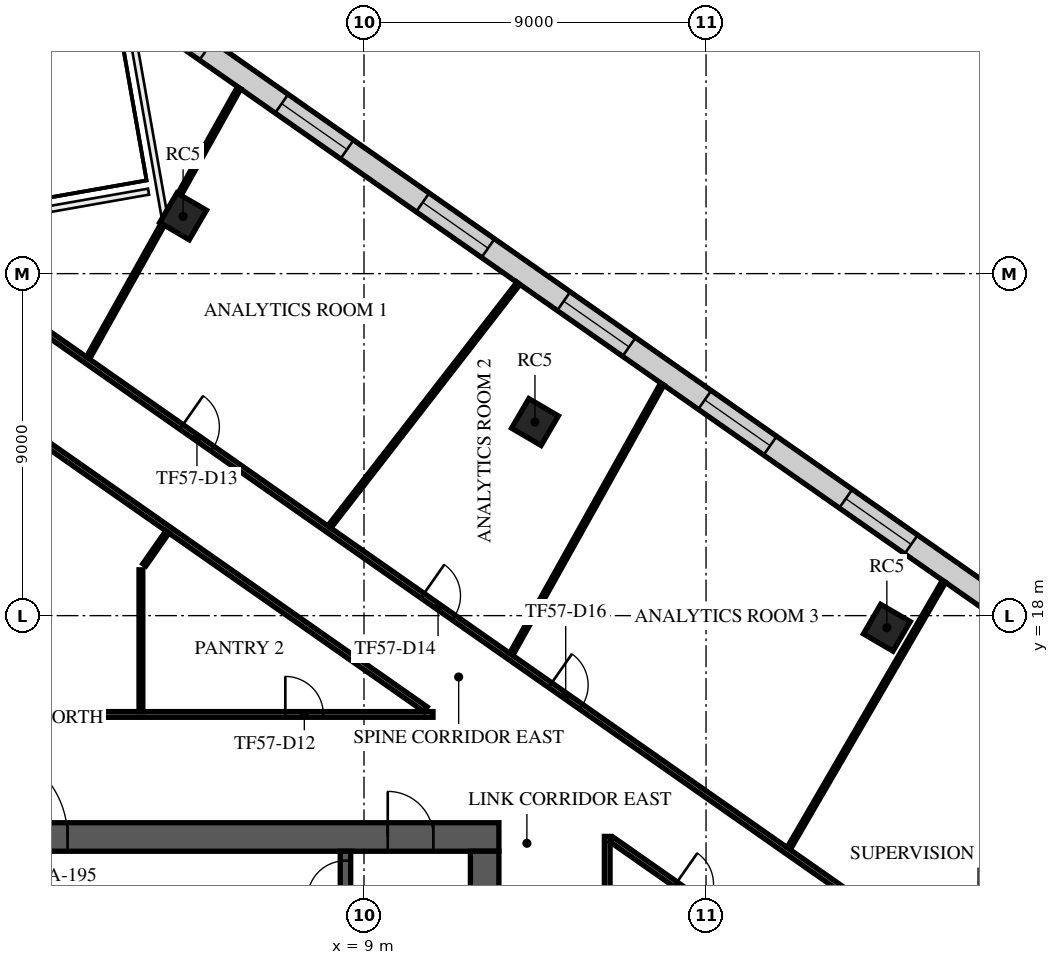
"""IFC4 building model, lengths in metres.
Left out: names, types, materials, properties, quantities, classifications, styles, units other than length and angle.
Written with IfcOpenShell. Run it as: python <this file> out.ifc"""

import sys

from ifc_helpers import new_model, si_unit, direction, frame, frame_2d, origin, origin_2d, place, context, subcontext, project, spatial, rectangle, extrude, element, fill, save


model = new_model("IFC4")
c1 = context("Model", 3, precision=1e-05, world=origin(), true_north=direction((0.0, 1.0)))
c2 = subcontext(c1, "Body", "Model", "MODEL_VIEW")
j1 = project(units=[si_unit("LENGTHUNIT", "METRE"), si_unit("PLANEANGLEUNIT", "RADIAN")], contexts=[c1])
p1 = place(None, origin())
s1 = spatial("IfcSite", under=j1, at=p1, CompositionType="ELEMENT")
p2 = place(p1, origin())
s2 = spatial("IfcBuilding", under=s1, at=p2, CompositionType="ELEMENT")
p3 = place(p2, frame((0.0, 0.0, 242.9)))
s3 = spatial("IfcBuildingStorey", under=s2, at=p3, CompositionType="ELEMENT", Elevation=242.9)
for number, where, z_axis, x_axis in (
    (1, (22.758, 17.682, -0.36), (0.0, 0.0, 1.0), (0.505, 0.863, 0.0)),
    (2, (13.499, 23.094, -0.36), (0.0, 0.0, 1.0), (0.505, 0.863, 0.0)),
    (3, (4.24, 28.506, -0.36), (0.0, 0.0, 1.0), (0.505, 0.863, 0.0)),
):
    element("IfcColumn", number, at=place(p3, frame(where, z_axis=z_axis, x_axis=x_axis)), inside=s3, PredefinedType="COLUMN", context=c2, shape_type="SweptSolid", body=[
        extrude(rectangle(XDim=0.9, YDim=0.9, at=origin_2d()), origin(), (0.0, 0.0, 1.0), 4.36),
    ])
p4 = place(p3, frame((-12.55, 12.175, 0.0), z_axis=(0.0, 0.0, 1.0), x_axis=(1.0, 0.0, 0.0)))
e4 = element("IfcWall", 4, at=p4, inside=s3, PredefinedType="SHEAR", context=c2, shape_type="SweptSolid", body=[
    extrude(rectangle(XDim=25.1, YDim=0.75, at=frame_2d((12.55, 0.0))), origin(), (0.0, 0.0, 1.0), 3.64),
])
p5 = place(p4, frame((11.35, 0.0, 0.0)))
e5 = element("IfcOpeningElement", 5, at=p5, cuts=e4, PredefinedType="OPENING", context=c2, shape_type="SweptSolid", body=[
    extrude(rectangle(XDim=2.4, YDim=2.4, at=frame_2d((1.2, 1.2))), frame((0.0, 0.385, 0.0), z_axis=(0.0, -1.0, 0.0), x_axis=(1.0, 0.0, 0.0)), (0.0, 0.0, 1.0), 0.77),
])
p6 = place(p4, frame((22.175, 0.0, 0.0)))
e6 = element("IfcOpeningElement", 6, at=p6, cuts=e4, PredefinedType="OPENING", context=c2, shape_type="SweptSolid", body=[
    extrude(rectangle(XDim=1.2, YDim=2.1, at=frame_2d((0.6, 1.05))), frame((0.0, 0.385, 0.0), z_axis=(0.0, -1.0, 0.0), x_axis=(1.0, 0.0, 0.0)), (0.0, 0.0, 1.0), 0.77),
])
p7 = place(p4, frame((1.15, 0.0, 0.0)))
e7 = element("IfcOpeningElement", 7, at=p7, cuts=e4, PredefinedType="OPENING", context=c2, shape_type="SweptSolid", body=[
    extrude(rectangle(XDim=1.0, YDim=2.1, at=frame_2d((0.5, 1.05))), frame((0.0, 0.385, 0.0), z_axis=(0.0, -1.0, 0.0), x_axis=(1.0, 0.0, 0.0)), (0.0, 0.0, 1.0), 0.77),
])
p8 = place(p3, frame((12.175, -11.8, 0.0), z_axis=(0.0, 0.0, 1.0), x_axis=(0.0, 1.0, 0.0)))
e8 = element("IfcWall", 8, at=p8, inside=s3, PredefinedType="SHEAR", context=c2, shape_type="SweptSolid", body=[
    extrude(rectangle(XDim=23.6, YDim=0.75, at=frame_2d((11.8, 0.0))), origin(), (0.0, 0.0, 1.0), 3.64),
])
p9 = place(p8, frame((10.6, 0.0, 0.0)))
e9 = element("IfcOpeningElement", 9, at=p9, cuts=e8, PredefinedType="OPENING", context=c2, shape_type="SweptSolid", body=[
    extrude(rectangle(XDim=2.4, YDim=2.4, at=frame_2d((1.2, 1.2))), frame((0.0, 0.385, 0.0), z_axis=(0.0, -1.0, 0.0), x_axis=(1.0, 0.0, 0.0)), (0.0, 0.0, 1.0), 0.77),
])
p10 = place(p3, frame((8.512, 4.55, 0.0), z_axis=(0.0, 0.0, 1.0), x_axis=(0.0, 1.0, 0.0)))
e10 = element("IfcWall", 10, at=p10, inside=s3, PredefinedType="SOLIDWALL", context=c2, shape_type="SweptSolid", body=[
    extrude(rectangle(XDim=7.25, YDim=0.275, at=frame_2d((3.625, 0.0))), origin(), (0.0, 0.0, 1.0), 3.64),
])
p11 = place(p10, frame((6.0, 0.0, 0.0)))
e11 = element("IfcOpeningElement", 11, at=p11, cuts=e10, PredefinedType="OPENING", context=c2, shape_type="SweptSolid", body=[
    extrude(rectangle(XDim=1.0, YDim=2.1, at=frame_2d((0.5, 1.05))), frame((0.0, 0.147, 0.0), z_axis=(0.0, -1.0, 0.0), x_axis=(1.0, 0.0, 0.0)), (0.0, 0.0, 1.0), 0.295),
])
p12 = place(p3, frame((31.815, 13.98, 0.0), z_axis=(0.0, 0.0, 1.0), x_axis=(-0.819152162902, 0.573576266955, 0.0)))
e12 = element("IfcWall", 12, at=p12, inside=s3, PredefinedType="STANDARD", context=c2, shape_type="SweptSolid", body=[
    extrude(rectangle(XDim=36.243, YDim=0.6, at=frame_2d((18.122, 0.0))), origin(), (0.0, 0.0, 1.0), 3.64),
])
p13 = place(p12, frame((1.215, 0.0, 0.9)))
e13 = element("IfcOpeningElement", 13, at=p13, cuts=e12, PredefinedType="OPENING", context=c2, shape_type="SweptSolid", body=[
    extrude(rectangle(XDim=2.1, YDim=2.1, at=frame_2d((1.05, 1.05))), frame((0.0, 0.31, 0.0), z_axis=(0.0, -1.0, 0.0), x_axis=(1.0, 0.0, 0.0)), (0.0, 0.0, 1.0), 0.62),
])
p14 = place(p12, frame((5.746, 0.0, 0.9)))
e14 = element("IfcOpeningElement", 14, at=p14, cuts=e12, PredefinedType="OPENING", context=c2, shape_type="SweptSolid", body=[
    extrude(rectangle(XDim=2.1, YDim=2.1, at=frame_2d((1.05, 1.05))), frame((0.0, 0.31, 0.0), z_axis=(0.0, -1.0, 0.0), x_axis=(1.0, 0.0, 0.0)), (0.0, 0.0, 1.0), 0.62),
])
p15 = place(p12, frame((10.276, 0.0, 0.9)))
e15 = element("IfcOpeningElement", 15, at=p15, cuts=e12, PredefinedType="OPENING", context=c2, shape_type="SweptSolid", body=[
    extrude(rectangle(XDim=2.1, YDim=2.1, at=frame_2d((1.05, 1.05))), frame((0.0, 0.31, 0.0), z_axis=(0.0, -1.0, 0.0), x_axis=(1.0, 0.0, 0.0)), (0.0, 0.0, 1.0), 0.62),
])
p16 = place(p12, frame((14.806, 0.0, 0.9)))
e16 = element("IfcOpeningElement", 16, at=p16, cuts=e12, PredefinedType="OPENING", context=c2, shape_type="SweptSolid", body=[
    extrude(rectangle(XDim=2.1, YDim=2.1, at=frame_2d((1.05, 1.05))), frame((0.0, 0.31, 0.0), z_axis=(0.0, -1.0, 0.0), x_axis=(1.0, 0.0, 0.0)), (0.0, 0.0, 1.0), 0.62),
])
p17 = place(p12, frame((19.337, 0.0, 0.9)))
e17 = element("IfcOpeningElement", 17, at=p17, cuts=e12, PredefinedType="OPENING", context=c2, shape_type="SweptSolid", body=[
    extrude(rectangle(XDim=2.1, YDim=2.1, at=frame_2d((1.05, 1.05))), frame((0.0, 0.31, 0.0), z_axis=(0.0, -1.0, 0.0), x_axis=(1.0, 0.0, 0.0)), (0.0, 0.0, 1.0), 0.62),
])
p18 = place(p12, frame((23.867, 0.0, 0.9)))
e18 = element("IfcOpeningElement", 18, at=p18, cuts=e12, PredefinedType="OPENING", context=c2, shape_type="SweptSolid", body=[
    extrude(rectangle(XDim=2.1, YDim=2.1, at=frame_2d((1.05, 1.05))), frame((0.0, 0.31, 0.0), z_axis=(0.0, -1.0, 0.0), x_axis=(1.0, 0.0, 0.0)), (0.0, 0.0, 1.0), 0.62),
])
p19 = place(p12, frame((28.398, 0.0, 0.9)))
e19 = element("IfcOpeningElement", 19, at=p19, cuts=e12, PredefinedType="OPENING", context=c2, shape_type="SweptSolid", body=[
    extrude(rectangle(XDim=2.1, YDim=2.1, at=frame_2d((1.05, 1.05))), frame((0.0, 0.31, 0.0), z_axis=(0.0, -1.0, 0.0), x_axis=(1.0, 0.0, 0.0)), (0.0, 0.0, 1.0), 0.62),
])
p20 = place(p12, frame((32.928, 0.0, 0.9)))
e20 = element("IfcOpeningElement", 20, at=p20, cuts=e12, PredefinedType="OPENING", context=c2, shape_type="SweptSolid", body=[
    extrude(rectangle(XDim=2.1, YDim=2.1, at=frame_2d((1.05, 1.05))), frame((0.0, 0.31, 0.0), z_axis=(0.0, -1.0, 0.0), x_axis=(1.0, 0.0, 0.0)), (0.0, 0.0, 1.0), 0.62),
])
p21 = place(p3, frame((-15.325, 15.4, 0.0), z_axis=(0.0, 0.0, 1.0), x_axis=(1.0, 0.0, 0.0)))
e21 = element("IfcWall", 21, at=p21, inside=s3, PredefinedType="PARTITIONING", context=c2, shape_type="SweptSolid", body=[
    extrude(rectangle(XDim=26.141, YDim=0.15, at=frame_2d((13.07, 0.0))), origin(), (0.0, 0.0, 1.0), 3.24),
])
p22 = place(p21, frame((9.55, 0.0, 0.0)))
e22 = element("IfcOpeningElement", 22, at=p22, cuts=e21, PredefinedType="OPENING", context=c2, shape_type="SweptSolid", body=[
    extrude(rectangle(XDim=1.0, YDim=2.1, at=frame_2d((0.5, 1.05))), frame((0.0, 0.085, 0.0), z_axis=(0.0, -1.0, 0.0), x_axis=(1.0, 0.0, 0.0)), (0.0, 0.0, 1.0), 0.17),
])
p23 = place(p21, frame((22.255, 0.0, 0.0)))
e23 = element("IfcOpeningElement", 23, at=p23, cuts=e21, PredefinedType="OPENING", context=c2, shape_type="SweptSolid", body=[
    extrude(rectangle(XDim=1.0, YDim=2.1, at=frame_2d((0.5, 1.05))), frame((0.0, 0.085, 0.0), z_axis=(0.0, -1.0, 0.0), x_axis=(1.0, 0.0, 0.0)), (0.0, 0.0, 1.0), 0.17),
])
p24 = place(p3, frame((-3.266, 25.26, 0.0), z_axis=(0.0, 0.0, 1.0), x_axis=(0.819150723298, -0.573578322917, 0.0)))
e24 = element("IfcWall", 24, at=p24, inside=s3, PredefinedType="PARTITIONING", context=c2, shape_type="SweptSolid", body=[
    extrude(rectangle(XDim=16.953, YDim=0.15, at=frame_2d((8.476, 0.0))), origin(), (0.0, 0.0, 1.0), 3.24),
])
p25 = place(p24, frame((2.55, 0.0, 0.0)))
e25 = element("IfcOpeningElement", 25, at=p25, cuts=e24, PredefinedType="OPENING", context=c2, shape_type="SweptSolid", body=[
    extrude(rectangle(XDim=1.8, YDim=2.1, at=frame_2d((0.9, 1.05))), frame((0.0, 0.085, 0.0), z_axis=(0.0, -1.0, 0.0), x_axis=(1.0, 0.0, 0.0)), (0.0, 0.0, 1.0), 0.17),
])
p26 = place(p3, frame((-1.89, 27.226, 0.0), z_axis=(0.0, 0.0, 1.0), x_axis=(0.819163235761, -0.573560452941, 0.0)))
e26 = element("IfcWall", 26, at=p26, inside=s3, PredefinedType="PARTITIONING", context=c2, shape_type="SweptSolid", body=[
    extrude(rectangle(XDim=34.403, YDim=0.15, at=frame_2d((17.202, 0.0))), origin(), (0.0, 0.0, 1.0), 3.24),
])
p27 = place(p26, frame((7.427, 0.0, 0.0)))
e27 = element("IfcOpeningElement", 27, at=p27, cuts=e26, PredefinedType="OPENING", context=c2, shape_type="SweptSolid", body=[
    extrude(rectangle(XDim=1.0, YDim=2.1, at=frame_2d((0.5, 1.05))), frame((0.0, 0.085, 0.0), z_axis=(0.0, -1.0, 0.0), x_axis=(1.0, 0.0, 0.0)), (0.0, 0.0, 1.0), 0.17),
])
p28 = place(p26, frame((15.173, 0.0, 0.0)))
e28 = element("IfcOpeningElement", 28, at=p28, cuts=e26, PredefinedType="OPENING", context=c2, shape_type="SweptSolid", body=[
    extrude(rectangle(XDim=1.0, YDim=2.1, at=frame_2d((0.5, 1.05))), frame((0.0, 0.085, 0.0), z_axis=(0.0, -1.0, 0.0), x_axis=(1.0, 0.0, 0.0)), (0.0, 0.0, 1.0), 0.17),
])
p29 = place(p26, frame((19.273, 0.0, 0.0)))
e29 = element("IfcOpeningElement", 29, at=p29, cuts=e26, PredefinedType="OPENING", context=c2, shape_type="SweptSolid", body=[
    extrude(rectangle(XDim=1.0, YDim=2.1, at=frame_2d((0.5, 1.05))), frame((0.0, 0.085, 0.0), z_axis=(0.0, -1.0, 0.0), x_axis=(1.0, 0.0, 0.0)), (0.0, 0.0, 1.0), 0.17),
])
p30 = place(p3, frame((15.4, 2.664, 0.0), z_axis=(0.0, 0.0, 1.0), x_axis=(0.0, 1.0, 0.0)))
e30 = element("IfcWall", 30, at=p30, inside=s3, PredefinedType="PARTITIONING", context=c2, shape_type="SweptSolid", body=[
    extrude(rectangle(XDim=9.526, YDim=0.15, at=frame_2d((4.763, 0.0))), origin(), (0.0, 0.0, 1.0), 3.24),
])
p31 = place(p3, frame((15.518, 12.107, 0.0), z_axis=(0.0, 0.0, 1.0), x_axis=(0.819171924474, -0.573548043457, 0.0)))
e31 = element("IfcWall", 31, at=p31, inside=s3, PredefinedType="PARTITIONING", context=c2, shape_type="SweptSolid", body=[
    extrude(rectangle(XDim=11.471, YDim=0.15, at=frame_2d((5.736, 0.0))), origin(), (0.0, 0.0, 1.0), 3.24),
])
p32 = place(p31, frame((2.05, 0.0, 0.0)))
e32 = element("IfcOpeningElement", 32, at=p32, cuts=e31, PredefinedType="OPENING", context=c2, shape_type="SweptSolid", body=[
    extrude(rectangle(XDim=1.0, YDim=2.1, at=frame_2d((0.5, 1.05))), frame((0.0, 0.085, 0.0), z_axis=(0.0, -1.0, 0.0), x_axis=(1.0, 0.0, 0.0)), (0.0, 0.0, 1.0), 0.17),
])
p33 = place(p31, frame((10.027, 0.0, 0.0)))
e33 = element("IfcOpeningElement", 33, at=p33, cuts=e31, PredefinedType="OPENING", context=c2, shape_type="SweptSolid", body=[
    extrude(rectangle(XDim=1.0, YDim=2.1, at=frame_2d((0.5, 1.05))), frame((0.0, 0.085, 0.0), z_axis=(0.0, -1.0, 0.0), x_axis=(1.0, 0.0, 0.0)), (0.0, 0.0, 1.0), 0.17),
])
p34 = place(p3, frame((1.739, 24.783, 0.0), z_axis=(0.0, 0.0, 1.0), x_axis=(0.488204523876, 0.872729249462, 0.0)))
e34 = element("IfcWall", 34, at=p34, inside=s3, PredefinedType="PARTITIONING", context=c2, shape_type="SweptSolid", body=[
    extrude(rectangle(XDim=4.027, YDim=0.1, at=frame_2d((2.013, 0.0))), origin(), (0.0, 0.0, 1.0), 3.24),
])
p35 = place(p3, frame((3.13, 15.475, 0.0), z_axis=(0.0, 0.0, 1.0), x_axis=(0.0, 1.0, 0.0)))
e35 = element("IfcWall", 35, at=p35, inside=s3, PredefinedType="PARTITIONING", context=c2, shape_type="SweptSolid", body=[
    extrude(rectangle(XDim=3.731, YDim=0.1, at=frame_2d((1.865, 0.0))), origin(), (0.0, 0.0, 1.0), 3.64),
])
p36 = place(p3, frame((3.221, 19.336, 0.0), z_axis=(0.0, 0.0, 1.0), x_axis=(0.573214319636, 0.819405481898, 0.0)))
e36 = element("IfcWall", 36, at=p36, inside=s3, PredefinedType="PARTITIONING", context=c2, shape_type="SweptSolid", body=[
    extrude(rectangle(XDim=1.057, YDim=0.1, at=frame_2d((0.529, 0.0))), origin(), (0.0, 0.0, 1.0), 3.24),
])
p37 = place(p3, frame((4.145, 29.083, 0.0), z_axis=(0.0, 0.0, 1.0), x_axis=(0.488182285446, 0.872741689263, 0.0)))
e37 = element("IfcWall", 37, at=p37, inside=s3, PredefinedType="PARTITIONING", context=c2, shape_type="SweptSolid", body=[
    extrude(rectangle(XDim=3.214, YDim=0.1, at=frame_2d((1.607, 0.0))), origin(), (0.0, 0.0, 1.0), 3.64),
])
p38 = place(p3, frame((8.089, 20.334, 0.0), z_axis=(0.0, 0.0, 1.0), x_axis=(0.613179783631, 0.789943385912, 0.0)))
e38 = element("IfcWall", 38, at=p38, inside=s3, PredefinedType="PARTITIONING", context=c2, shape_type="SweptSolid", body=[
    extrude(rectangle(XDim=8.112, YDim=0.1, at=frame_2d((4.056, 0.0))), origin(), (0.0, 0.0, 1.0), 3.24),
])
p39 = place(p3, frame((12.876, 16.985, 0.0), z_axis=(0.0, 0.0, 1.0), x_axis=(0.487744732035, 0.872986297929, 0.0)))
e39 = element("IfcWall", 39, at=p39, inside=s3, PredefinedType="PARTITIONING", context=c2, shape_type="SweptSolid", body=[
    extrude(rectangle(XDim=8.141, YDim=0.1, at=frame_2d((4.07, 0.0))), origin(), (0.0, 0.0, 1.0), 3.24),
])
p40 = place(p3, frame((20.177, 11.873, 0.0), z_axis=(0.0, 0.0, 1.0), x_axis=(0.502475319919, 0.864591552626, 0.0)))
e40 = element("IfcWall", 40, at=p40, inside=s3, PredefinedType="PARTITIONING", context=c2, shape_type="SweptSolid", body=[
    extrude(rectangle(XDim=8.128, YDim=0.1, at=frame_2d((4.064, 0.0))), origin(), (0.0, 0.0, 1.0), 3.24),
])
p41 = place(p5, origin())
e41 = element("IfcDoor", 41, at=p41, inside=s3, OperationType="SINGLE_SWING_LEFT", PredefinedType="DOOR", context=c2, shape_type="SweptSolid", body=[
    extrude(rectangle(XDim=2.4, YDim=2.4, at=frame_2d((1.2, 1.2))), frame((0.0, 0.025, 0.0), z_axis=(0.0, -1.0, 0.0), x_axis=(1.0, 0.0, 0.0)), (0.0, 0.0, 1.0), 0.05),
])
fill(e5, e41)
p42 = place(p6, origin())
e42 = element("IfcDoor", 42, at=p42, inside=s3, OperationType="SINGLE_SWING_LEFT", PredefinedType="DOOR", context=c2, shape_type="SweptSolid", body=[
    extrude(rectangle(XDim=1.2, YDim=2.1, at=frame_2d((0.6, 1.05))), frame((0.0, 0.025, 0.0), z_axis=(0.0, -1.0, 0.0), x_axis=(1.0, 0.0, 0.0)), (0.0, 0.0, 1.0), 0.05),
])
fill(e6, e42)
p43 = place(p11, origin())
e43 = element("IfcDoor", 43, at=p43, inside=s3, OperationType="SINGLE_SWING_LEFT", PredefinedType="DOOR", context=c2, shape_type="SweptSolid", body=[
    extrude(rectangle(XDim=1.0, YDim=2.1, at=frame_2d((0.5, 1.05))), frame((0.0, 0.025, 0.0), z_axis=(0.0, -1.0, 0.0), x_axis=(1.0, 0.0, 0.0)), (0.0, 0.0, 1.0), 0.05),
])
fill(e11, e43)
p44 = place(p15, origin())
e44 = element("IfcWindow", 44, at=p44, inside=s3, PartitioningType="SINGLE_PANEL", PredefinedType="WINDOW", context=c2, shape_type="SweptSolid", body=[
    extrude(rectangle(XDim=2.1, YDim=2.1, at=frame_2d((1.05, 1.05))), frame((0.0, 0.03, 0.0), z_axis=(0.0, -1.0, 0.0), x_axis=(1.0, 0.0, 0.0)), (0.0, 0.0, 1.0), 0.06),
])
fill(e15, e44)
p45 = place(p16, origin())
e45 = element("IfcWindow", 45, at=p45, inside=s3, PartitioningType="SINGLE_PANEL", PredefinedType="WINDOW", context=c2, shape_type="SweptSolid", body=[
    extrude(rectangle(XDim=2.1, YDim=2.1, at=frame_2d((1.05, 1.05))), frame((0.0, 0.03, 0.0), z_axis=(0.0, -1.0, 0.0), x_axis=(1.0, 0.0, 0.0)), (0.0, 0.0, 1.0), 0.06),
])
fill(e16, e45)
p46 = place(p17, origin())
e46 = element("IfcWindow", 46, at=p46, inside=s3, PartitioningType="SINGLE_PANEL", PredefinedType="WINDOW", context=c2, shape_type="SweptSolid", body=[
    extrude(rectangle(XDim=2.1, YDim=2.1, at=frame_2d((1.05, 1.05))), frame((0.0, 0.03, 0.0), z_axis=(0.0, -1.0, 0.0), x_axis=(1.0, 0.0, 0.0)), (0.0, 0.0, 1.0), 0.06),
])
fill(e17, e46)
p47 = place(p18, origin())
e47 = element("IfcWindow", 47, at=p47, inside=s3, PartitioningType="SINGLE_PANEL", PredefinedType="WINDOW", context=c2, shape_type="SweptSolid", body=[
    extrude(rectangle(XDim=2.1, YDim=2.1, at=frame_2d((1.05, 1.05))), frame((0.0, 0.03, 0.0), z_axis=(0.0, -1.0, 0.0), x_axis=(1.0, 0.0, 0.0)), (0.0, 0.0, 1.0), 0.06),
])
fill(e18, e47)
p48 = place(p19, origin())
e48 = element("IfcWindow", 48, at=p48, inside=s3, PartitioningType="SINGLE_PANEL", PredefinedType="WINDOW", context=c2, shape_type="SweptSolid", body=[
    extrude(rectangle(XDim=2.1, YDim=2.1, at=frame_2d((1.05, 1.05))), frame((0.0, 0.03, 0.0), z_axis=(0.0, -1.0, 0.0), x_axis=(1.0, 0.0, 0.0)), (0.0, 0.0, 1.0), 0.06),
])
fill(e19, e48)
p49 = place(p20, origin())
e49 = element("IfcWindow", 49, at=p49, inside=s3, PartitioningType="SINGLE_PANEL", PredefinedType="WINDOW", context=c2, shape_type="SweptSolid", body=[
    extrude(rectangle(XDim=2.1, YDim=2.1, at=frame_2d((1.05, 1.05))), frame((0.0, 0.03, 0.0), z_axis=(0.0, -1.0, 0.0), x_axis=(1.0, 0.0, 0.0)), (0.0, 0.0, 1.0), 0.06),
])
fill(e20, e49)
p50 = place(p23, origin())
e50 = element("IfcDoor", 50, at=p50, inside=s3, OperationType="SINGLE_SWING_LEFT", PredefinedType="DOOR", context=c2, shape_type="SweptSolid", body=[
    extrude(rectangle(XDim=1.0, YDim=2.1, at=frame_2d((0.5, 1.05))), frame((0.0, 0.025, 0.0), z_axis=(0.0, -1.0, 0.0), x_axis=(1.0, 0.0, 0.0)), (0.0, 0.0, 1.0), 0.05),
])
fill(e23, e50)
p51 = place(p27, origin())
e51 = element("IfcDoor", 51, at=p51, inside=s3, OperationType="SINGLE_SWING_LEFT", PredefinedType="DOOR", context=c2, shape_type="SweptSolid", body=[
    extrude(rectangle(XDim=1.0, YDim=2.1, at=frame_2d((0.5, 1.05))), frame((0.0, 0.025, 0.0), z_axis=(0.0, -1.0, 0.0), x_axis=(1.0, 0.0, 0.0)), (0.0, 0.0, 1.0), 0.05),
])
fill(e27, e51)
p52 = place(p28, origin())
e52 = element("IfcDoor", 52, at=p52, inside=s3, OperationType="SINGLE_SWING_RIGHT", PredefinedType="DOOR", context=c2, shape_type="SweptSolid", body=[
    extrude(rectangle(XDim=1.0, YDim=2.1, at=frame_2d((0.5, 1.05))), frame((0.0, 0.025, 0.0), z_axis=(0.0, -1.0, 0.0), x_axis=(1.0, 0.0, 0.0)), (0.0, 0.0, 1.0), 0.05),
])
fill(e28, e52)
p53 = place(p32, frame((1.0, 0.0, 0.0), z_axis=(0.0, 0.0, 1.0), x_axis=(-1.0, 0.0, 0.0)))
e53 = element("IfcDoor", 53, at=p53, inside=s3, OperationType="SINGLE_SWING_LEFT", PredefinedType="DOOR", context=c2, shape_type="SweptSolid", body=[
    extrude(rectangle(XDim=1.0, YDim=2.1, at=frame_2d((0.5, 1.05))), frame((0.0, 0.025, 0.0), z_axis=(0.0, -1.0, 0.0), x_axis=(1.0, 0.0, 0.0)), (0.0, 0.0, 1.0), 0.05),
])
fill(e32, e53)
p54 = place(p29, origin())
e54 = element("IfcDoor", 54, at=p54, inside=s3, OperationType="SINGLE_SWING_LEFT", PredefinedType="DOOR", context=c2, shape_type="SweptSolid", body=[
    extrude(rectangle(XDim=1.0, YDim=2.1, at=frame_2d((0.5, 1.05))), frame((0.0, 0.025, 0.0), z_axis=(0.0, -1.0, 0.0), x_axis=(1.0, 0.0, 0.0)), (0.0, 0.0, 1.0), 0.05),
])
fill(e29, e54)
save(model, sys.argv[1])
